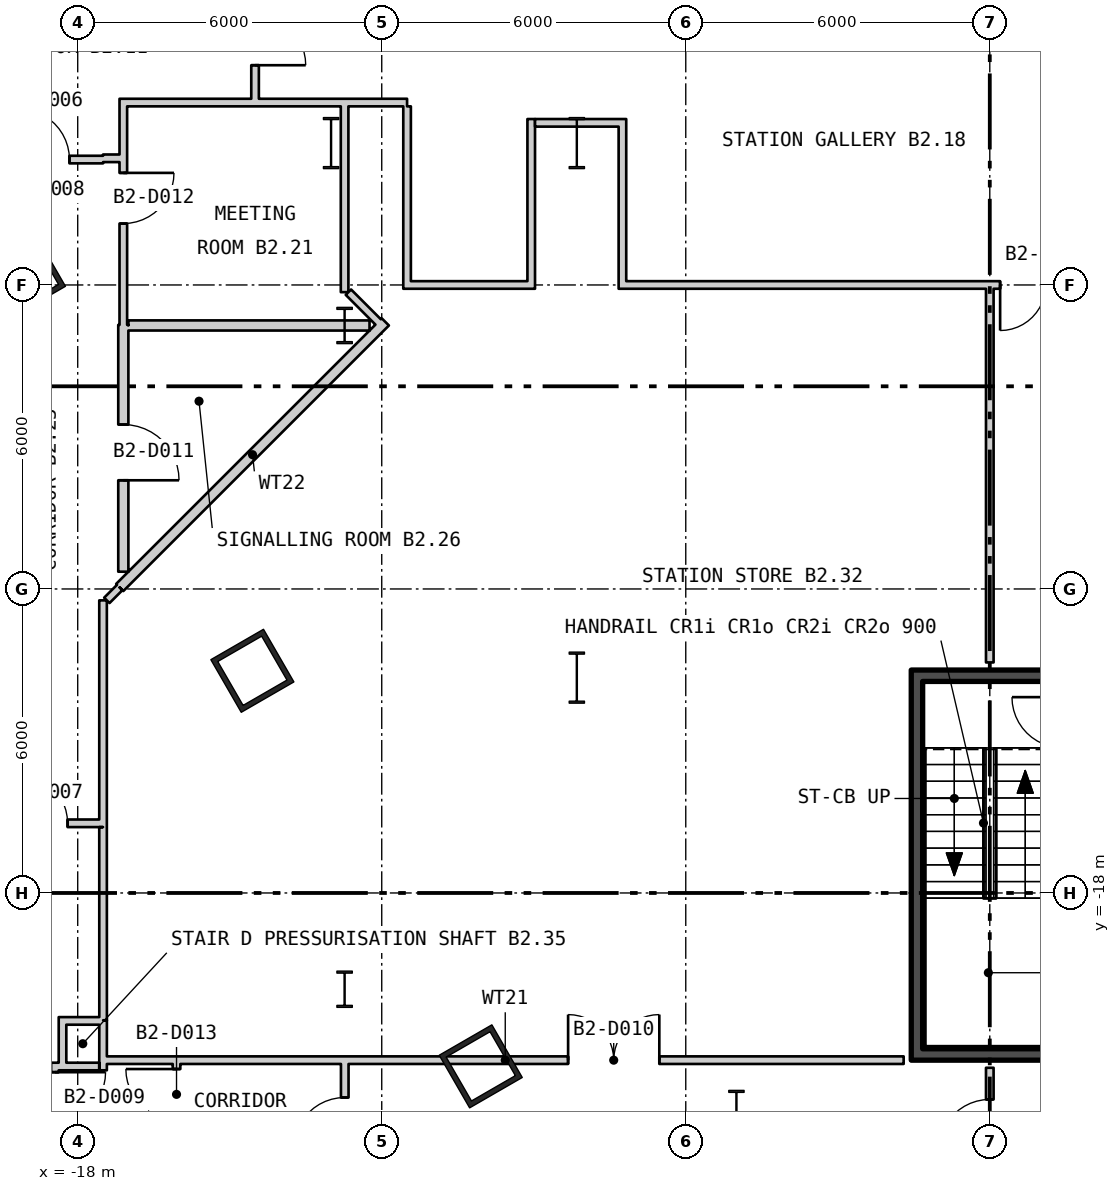
"""IFC4 building model, lengths in metres.
Left out: names, types, materials, properties, quantities, classifications, styles, units other than length and angle.
Written with IfcOpenShell. Run it as: python <this file> out.ifc"""

import sys

from ifc_helpers import new_model, si_unit, direction, frame, frame_2d, origin, origin_2d, place, context, subcontext, project, spatial, rectangle, hollow_rectangle, i_section, extrude, element, fill, save


model = new_model("IFC4")
c1 = context("Model", 3, precision=1e-05, world=origin(), true_north=direction((0.0, 1.0)))
c2 = subcontext(c1, "Body", "Model", "MODEL_VIEW")
j1 = project(units=[si_unit("LENGTHUNIT", "METRE"), si_unit("PLANEANGLEUNIT", "RADIAN")], contexts=[c1])
p1 = place(None, origin())
s1 = spatial("IfcSite", under=j1, at=p1, CompositionType="ELEMENT")
p2 = place(p1, origin())
s2 = spatial("IfcBuilding", under=s1, at=p2, CompositionType="ELEMENT")
p3 = place(p2, frame((0.0, 0.0, -11.4)))
s3 = spatial("IfcBuildingStorey", under=s2, at=p3, CompositionType="ELEMENT", Elevation=-11.4)
for number, where, z_axis, x_axis in (
    (1, (-19.061, -5.807, 0.0), (0.0, 0.0, 1.0), (0.5, -0.866, 0.0)),
    (2, (-14.553, -13.615, 0.0), (0.0, 0.0, 1.0), (0.5, -0.866, 0.0)),
    (3, (-10.046, -21.422, 0.0), (0.0, 0.0, 1.0), (0.5, -0.866, 0.0)),
):
    element("IfcColumn", number, at=place(p3, frame(where, z_axis=z_axis, x_axis=x_axis)), inside=s3, PredefinedType="COLUMN", context=c2, shape_type="SweptSolid", body=[
        extrude(hollow_rectangle(XDim=1.2, YDim=1.2, WallThickness=0.1, at=origin_2d()), origin(), (0.0, 0.0, 1.0), 5.7),
    ])
for number, where, z_axis, x_axis in (
    (4, (-8.15, -3.2, 0.0), (0.0, 0.0, 1.0), (1.0, 0.0, 0.0)),
    (5, (-8.15, -13.75, 0.0), (0.0, 0.0, 1.0), (1.0, 0.0, 0.0)),
    (6, (-5.0, -22.4, 0.0), (0.0, 0.0, 1.0), (1.0, 0.0, 0.0)),
    (7, (-13.0, -3.2, 0.0), (0.0, 0.0, 1.0), (1.0, 0.0, 0.0)),
):
    element("IfcColumn", number, at=place(p3, frame(where, z_axis=z_axis, x_axis=x_axis)), inside=s3, PredefinedType="COLUMN", context=c2, shape_type="SweptSolid", body=[
        extrude(i_section(OverallWidth=0.302, OverallDepth=1.008, WebThickness=0.021, FlangeThickness=0.04, at=origin_2d()), origin(), (0.0, 0.0, 1.0), 5.7),
    ])
for number, where, z_axis, x_axis in (
    (8, (-12.733, -6.8, 0.0), (0.0, 0.0, 1.0), (1.0, 0.0, 0.0)),
    (9, (-12.733, -19.9, 0.0), (0.0, 0.0, 1.0), (1.0, 0.0, 0.0)),
):
    element("IfcColumn", number, at=place(p3, frame(where, z_axis=z_axis, x_axis=x_axis)), inside=s3, PredefinedType="COLUMN", context=c2, shape_type="SweptSolid", body=[
        extrude(i_section(OverallWidth=0.304, OverallDepth=0.716, WebThickness=0.021, FlangeThickness=0.04, at=origin_2d()), origin(), (0.0, 0.0, 1.0), 5.7),
    ])
p4 = place(p3, frame((-1.438, -21.075, 0.0), z_axis=(0.0, 0.0, 1.0), x_axis=(0.0, 1.0, 0.0)))
e10 = element("IfcWall", 10, at=p4, inside=s3, PredefinedType="SHEAR", context=c2, shape_type="SweptSolid", body=[
    extrude(rectangle(XDim=7.25, YDim=0.225, at=frame_2d((3.625, 0.0))), origin(), (0.0, 0.0, 1.0), 5.25),
])
for number, where, z_axis, x_axis in (
    (11, (-1.55, -21.188, 0.0), (0.0, 0.0, 1.0), (1.0, 0.0, 0.0)),
    (12, (-1.55, -13.713, 0.0), (0.0, 0.0, 1.0), (1.0, 0.0, 0.0)),
):
    element("IfcWall", number, at=place(p3, frame(where, z_axis=z_axis, x_axis=x_axis)), inside=s3, PredefinedType="SHEAR", context=c2, shape_type="SweptSolid", body=[
        extrude(rectangle(XDim=3.1, YDim=0.225, at=frame_2d((1.55, 0.0))), origin(), (0.0, 0.0, 1.0), 5.25),
    ])
p5 = place(p3, frame((-19.825, -16.625, 0.0), z_axis=(0.0, 0.0, 1.0), x_axis=(1.0, 0.0, 0.0)))
e13 = element("IfcWall", 13, at=p5, inside=s3, PredefinedType="PARTITIONING", context=c2, shape_type="SweptSolid", body=[
    extrude(rectangle(XDim=2.25, YDim=0.15, at=frame_2d((1.125, 0.0))), origin(), (0.0, 0.0, 1.0), 5.25),
])
p6 = place(p5, frame((0.625, 0.0, 0.0)))
e14 = element("IfcOpeningElement", 14, at=p6, cuts=e13, PredefinedType="OPENING", context=c2, shape_type="SweptSolid", body=[
    extrude(rectangle(XDim=1.0, YDim=2.1, at=frame_2d((0.5, 1.05))), frame((0.0, 0.085, 0.0), z_axis=(0.0, -1.0, 0.0), x_axis=(1.0, 0.0, 0.0)), (0.0, 0.0, 1.0), 0.17),
])
p7 = place(p3, frame((-19.825, -3.525, 0.0), z_axis=(0.0, 0.0, 1.0), x_axis=(1.0, 0.0, 0.0)))
e15 = element("IfcWall", 15, at=p7, inside=s3, PredefinedType="PARTITIONING", context=c2, shape_type="SweptSolid", body=[
    extrude(rectangle(XDim=2.325, YDim=0.15, at=frame_2d((1.163, 0.0))), origin(), (0.0, 0.0, 1.0), 5.25),
])
p8 = place(p7, frame((0.662, 0.0, 0.0)))
e16 = element("IfcOpeningElement", 16, at=p8, cuts=e15, PredefinedType="OPENING", context=c2, shape_type="SweptSolid", body=[
    extrude(rectangle(XDim=1.0, YDim=2.1, at=frame_2d((0.5, 1.05))), frame((0.0, 0.085, 0.0), z_axis=(0.0, -1.0, 0.0), x_axis=(1.0, 0.0, 0.0)), (0.0, 0.0, 1.0), 0.17),
])
p9 = place(p3, frame((-18.45, -23.55, 0.0), z_axis=(0.0, 0.0, 1.0), x_axis=(0.0, 1.0, 0.0)))
e17 = element("IfcWall", 17, at=p9, inside=s3, PredefinedType="PARTITIONING", context=c2, shape_type="SweptSolid", body=[
    extrude(rectangle(XDim=2.2, YDim=0.15, at=frame_2d((1.1, 0.0))), origin(), (0.0, 0.0, 1.0), 5.25),
])
p10 = place(p9, frame((1.013, 0.0, 0.0)))
e18 = element("IfcOpeningElement", 18, at=p10, cuts=e17, PredefinedType="OPENING", context=c2, shape_type="SweptSolid", body=[
    extrude(rectangle(XDim=1.0, YDim=2.1, at=frame_2d((0.5, 1.05))), frame((0.0, 0.085, 0.0), z_axis=(0.0, -1.0, 0.0), x_axis=(1.0, 0.0, 0.0)), (0.0, 0.0, 1.0), 0.17),
])
p11 = place(p3, frame((-18.3, -21.5, 0.0), z_axis=(0.0, 0.0, 1.0), x_axis=(0.0, 1.0, 0.0)))
e19 = element("IfcWall", 19, at=p11, inside=s3, PredefinedType="PARTITIONING", context=c2, shape_type="SweptSolid", body=[
    extrude(rectangle(XDim=1.05, YDim=0.15, at=frame_2d((0.525, 0.0))), origin(), (0.0, 0.0, 1.0), 5.25),
])
p12 = place(p3, frame((-18.225, -21.425, 0.0), z_axis=(0.0, 0.0, 1.0), x_axis=(1.0, 0.0, 0.0)))
e20 = element("IfcWall", 20, at=p12, inside=s3, PredefinedType="PARTITIONING", context=c2, shape_type="SweptSolid", body=[
    extrude(rectangle(XDim=0.65, YDim=0.15, at=frame_2d((0.325, 0.0))), origin(), (0.0, 0.0, 1.0), 5.25),
])
p13 = place(p3, frame((-18.225, -20.525, 0.0), z_axis=(0.0, 0.0, 1.0), x_axis=(1.0, 0.0, 0.0)))
e21 = element("IfcWall", 21, at=p13, inside=s3, PredefinedType="PARTITIONING", context=c2, shape_type="SweptSolid", body=[
    extrude(rectangle(XDim=0.651, YDim=0.15, at=frame_2d((0.326, 0.0))), origin(), (0.0, 0.0, 1.0), 5.25),
])
p14 = place(p3, frame((-17.5, -21.5, 0.0), z_axis=(0.0, 0.0, 1.0), x_axis=(0.001013170706, 0.999999486742, 0.0)))
e22 = element("IfcWall", 22, at=p14, inside=s3, PredefinedType="PARTITIONING", context=c2, shape_type="SweptSolid", body=[
    extrude(rectangle(XDim=0.987, YDim=0.15, at=frame_2d((0.493, 0.0))), origin(), (0.0, 0.0, 1.0), 5.25),
])
p15 = place(p3, frame((-17.5, -16.7, 0.0), z_axis=(0.0, 0.0, 1.0), x_axis=(0.0, 1.0, 0.0)))
e23 = element("IfcWall", 23, at=p15, inside=s3, PredefinedType="PARTITIONING", context=c2, shape_type="SweptSolid", body=[
    extrude(rectangle(XDim=4.475, YDim=0.15, at=frame_2d((2.237, 0.0))), origin(), (0.0, 0.0, 1.0), 5.25),
])
p16 = place(p3, frame((-17.5, -3.5, 0.0), z_axis=(0.0, 0.0, 1.0), x_axis=(1.0, 0.0, 0.0)))
e24 = element("IfcWall", 24, at=p16, inside=s3, PredefinedType="PARTITIONING", context=c2, shape_type="SweptSolid", body=[
    extrude(rectangle(XDim=0.325, YDim=0.15, at=frame_2d((0.163, 0.0))), origin(), (0.0, 0.0, 1.0), 5.25),
])
p17 = place(p3, frame((-17.5, -16.7, 0.0), z_axis=(0.0, 0.0, 1.0), x_axis=(0.000262260678, -0.99999996561, 0.0)))
e25 = element("IfcWall", 25, at=p17, inside=s3, PredefinedType="PARTITIONING", context=c2, shape_type="SweptSolid", body=[
    extrude(rectangle(XDim=3.813, YDim=0.15, at=frame_2d((1.907, 0.0))), origin(), (0.0, 0.0, 1.0), 5.25),
])
p18 = place(p3, frame((-17.425, -12.225, 0.0), z_axis=(0.0, 0.0, 1.0), x_axis=(0.707106781187, 0.707106781187, 0.0)))
e26 = element("IfcWall", 26, at=p18, inside=s3, PredefinedType="PARTITIONING", context=c2, shape_type="SweptSolid", body=[
    extrude(rectangle(XDim=0.359, YDim=0.15, at=frame_2d((0.18, 0.0))), origin(), (0.0, 0.0, 1.0), 5.25),
])
p19 = place(p3, frame((-17.425, -21.3, 0.0), z_axis=(0.0, 0.0, 1.0), x_axis=(1.0, 0.0, 0.0)))
e27 = element("IfcWall", 27, at=p19, inside=s3, PredefinedType="PARTITIONING", context=c2, shape_type="SweptSolid", body=[
    extrude(rectangle(XDim=15.725, YDim=0.15, at=frame_2d((7.862, 0.0))), origin(), (0.0, 0.0, 1.0), 5.25),
])
p20 = place(p19, frame((9.103, 0.0, 0.0)))
e28 = element("IfcOpeningElement", 28, at=p20, cuts=e27, PredefinedType="OPENING", context=c2, shape_type="SweptSolid", body=[
    extrude(rectangle(XDim=1.8, YDim=2.1, at=frame_2d((0.9, 1.05))), frame((0.0, 0.085, 0.0), z_axis=(0.0, -1.0, 0.0), x_axis=(1.0, 0.0, 0.0)), (0.0, 0.0, 1.0), 0.17),
])
p21 = place(p3, frame((-17.175, -2.4, 0.0), z_axis=(0.0, 0.0, 1.0), x_axis=(1.0, 0.0, 0.0)))
e29 = element("IfcWall", 29, at=p21, inside=s3, PredefinedType="PARTITIONING", context=c2, shape_type="SweptSolid", body=[
    extrude(rectangle(XDim=5.675, YDim=0.15, at=frame_2d((2.837, 0.0))), origin(), (0.0, 0.0, 1.0), 5.25),
])
p22 = place(p3, frame((-17.171, -11.971, 0.0), z_axis=(0.0, 0.0, 1.0), x_axis=(0.707106781187, 0.707106781187, 0.0)))
e30 = element("IfcWall", 30, at=p22, inside=s3, PredefinedType="PARTITIONING", context=c2, shape_type="SweptSolid", body=[
    extrude(rectangle(XDim=7.413, YDim=0.2, at=frame_2d((3.707, 0.0))), origin(), (0.0, 0.0, 1.0), 5.25),
])
p23 = place(p3, frame((-17.1, -11.659, 0.0), z_axis=(0.0, 0.0, 1.0), x_axis=(0.0, 1.0, 0.0)))
e31 = element("IfcWall", 31, at=p23, inside=s3, PredefinedType="PARTITIONING", context=c2, shape_type="SweptSolid", body=[
    extrude(rectangle(XDim=4.871, YDim=0.2, at=frame_2d((2.436, 0.0))), origin(), (0.0, 0.0, 1.0), 5.25),
])
p24 = place(p23, frame((1.804, 0.0, 0.0)))
e32 = element("IfcOpeningElement", 32, at=p24, cuts=e31, PredefinedType="OPENING", context=c2, shape_type="SweptSolid", body=[
    extrude(rectangle(XDim=1.1, YDim=2.1, at=frame_2d((0.55, 1.05))), frame((0.0, 0.11, 0.0), z_axis=(0.0, -1.0, 0.0), x_axis=(1.0, 0.0, 0.0)), (0.0, 0.0, 1.0), 0.22),
])
p25 = place(p3, frame((-17.1, -6.788, 0.0), z_axis=(0.0, 0.0, 1.0), x_axis=(0.0, 1.0, 0.0)))
e33 = element("IfcWall", 33, at=p25, inside=s3, PredefinedType="PARTITIONING", context=c2, shape_type="SweptSolid", body=[
    extrude(rectangle(XDim=4.313, YDim=0.15, at=frame_2d((2.156, 0.0))), origin(), (0.0, 0.0, 1.0), 5.25),
])
p26 = place(p25, frame((2.0, 0.0, 0.0)))
e34 = element("IfcOpeningElement", 34, at=p26, cuts=e33, PredefinedType="OPENING", context=c2, shape_type="SweptSolid", body=[
    extrude(rectangle(XDim=1.0, YDim=2.1, at=frame_2d((0.5, 1.05))), frame((0.0, 0.085, 0.0), z_axis=(0.0, -1.0, 0.0), x_axis=(1.0, 0.0, 0.0)), (0.0, 0.0, 1.0), 0.17),
])
p27 = place(p3, frame((-17.0, -6.799, 0.0), z_axis=(0.0, 0.0, 1.0), x_axis=(0.999999977923, -0.000210128174, 0.0)))
e35 = element("IfcWall", 35, at=p27, inside=s3, PredefinedType="PARTITIONING", context=c2, shape_type="SweptSolid", body=[
    extrude(rectangle(XDim=4.759, YDim=0.2, at=frame_2d((2.38, 0.0))), origin(), (0.0, 0.0, 1.0), 5.25),
])
p28 = place(p3, frame((-16.05, -23.55, 0.0), z_axis=(0.0, 0.0, 1.0), x_axis=(0.0, 1.0, 0.0)))
e36 = element("IfcWall", 36, at=p28, inside=s3, PredefinedType="PARTITIONING", context=c2, shape_type="SweptSolid", body=[
    extrude(rectangle(XDim=2.175, YDim=0.15, at=frame_2d((1.087, 0.0))), origin(), (0.0, 0.0, 1.0), 5.25),
])
p29 = place(p28, frame((1.075, 0.0, 0.0)))
e37 = element("IfcOpeningElement", 37, at=p29, cuts=e36, PredefinedType="OPENING", context=c2, shape_type="SweptSolid", body=[
    extrude(rectangle(XDim=1.0, YDim=2.1, at=frame_2d((0.5, 1.05))), frame((0.0, 0.085, 0.0), z_axis=(0.0, -1.0, 0.0), x_axis=(1.0, 0.0, 0.0)), (0.0, 0.0, 1.0), 0.17),
])
p30 = place(p3, frame((-14.5, -2.325, 0.0), z_axis=(0.0, 0.0, 1.0), x_axis=(0.0, 1.0, 0.0)))
e38 = element("IfcWall", 38, at=p30, inside=s3, PredefinedType="PARTITIONING", context=c2, shape_type="SweptSolid", body=[
    extrude(rectangle(XDim=2.325, YDim=0.15, at=frame_2d((1.163, 0.0))), origin(), (0.0, 0.0, 1.0), 5.25),
])
p31 = place(p30, frame((0.662, 0.0, 0.0)))
e39 = element("IfcOpeningElement", 39, at=p31, cuts=e38, PredefinedType="OPENING", context=c2, shape_type="SweptSolid", body=[
    extrude(rectangle(XDim=1.0, YDim=2.1, at=frame_2d((0.5, 1.05))), frame((0.0, 0.085, 0.0), z_axis=(0.0, -1.0, 0.0), x_axis=(1.0, 0.0, 0.0)), (0.0, 0.0, 1.0), 0.17),
])
p32 = place(p3, frame((-12.733, -6.142, 0.0), z_axis=(0.0, 0.0, 1.0), x_axis=(0.0, 1.0, 0.0)))
e40 = element("IfcWall", 40, at=p32, inside=s3, PredefinedType="PARTITIONING", context=c2, shape_type="SweptSolid", body=[
    extrude(rectangle(XDim=3.667, YDim=0.15, at=frame_2d((1.833, 0.0))), origin(), (0.0, 0.0, 1.0), 5.25),
])
p33 = place(p3, frame((-12.73, -23.699, 0.0), z_axis=(0.0, 0.0, 1.0), x_axis=(0.0, 1.0, 0.0)))
e41 = element("IfcWall", 41, at=p33, inside=s3, PredefinedType="PARTITIONING", context=c2, shape_type="SweptSolid", body=[
    extrude(rectangle(XDim=2.324, YDim=0.15, at=frame_2d((1.162, 0.0))), origin(), (0.0, 0.0, 1.0), 5.25),
])
p34 = place(p33, frame((0.662, 0.0, 0.0)))
e42 = element("IfcOpeningElement", 42, at=p34, cuts=e41, PredefinedType="OPENING", context=c2, shape_type="SweptSolid", body=[
    extrude(rectangle(XDim=1.0, YDim=2.1, at=frame_2d((0.5, 1.05))), frame((0.0, 0.085, 0.0), z_axis=(0.0, -1.0, 0.0), x_axis=(1.0, 0.0, 0.0)), (0.0, 0.0, 1.0), 0.17),
])
p35 = place(p3, frame((-12.658, -6.142, 0.0), z_axis=(0.0, 0.0, 1.0), x_axis=(0.706504732317, -0.707708317892, 0.0)))
e43 = element("IfcWall", 43, at=p35, inside=s3, PredefinedType="PARTITIONING", context=c2, shape_type="SweptSolid", body=[
    extrude(rectangle(XDim=0.831, YDim=0.15, at=frame_2d((0.415, 0.0))), origin(), (0.0, 0.0, 1.0), 5.25),
])
p36 = place(p3, frame((-11.5, -6.075, 0.0), z_axis=(0.0, 0.0, 1.0), x_axis=(0.0, 1.0, 0.0)))
e44 = element("IfcWall", 44, at=p36, inside=s3, PredefinedType="PARTITIONING", context=c2, shape_type="SweptSolid", body=[
    extrude(rectangle(XDim=3.6, YDim=0.15, at=frame_2d((1.8, 0.0))), origin(), (0.0, 0.0, 1.0), 5.25),
])
p37 = place(p3, frame((-11.425, -6.0, 0.0), z_axis=(0.0, 0.0, 1.0), x_axis=(1.0, 0.0, 0.0)))
e45 = element("IfcWall", 45, at=p37, inside=s3, PredefinedType="PARTITIONING", context=c2, shape_type="SweptSolid", body=[
    extrude(rectangle(XDim=2.3, YDim=0.15, at=frame_2d((1.15, 0.0))), origin(), (0.0, 0.0, 1.0), 5.25),
])
p38 = place(p3, frame((-9.05, -6.075, 0.0), z_axis=(0.0, 0.0, 1.0), x_axis=(0.0, 1.0, 0.0)))
e46 = element("IfcWall", 46, at=p38, inside=s3, PredefinedType="PARTITIONING", context=c2, shape_type="SweptSolid", body=[
    extrude(rectangle(XDim=3.35, YDim=0.15, at=frame_2d((1.675, 0.0))), origin(), (0.0, 0.0, 1.0), 5.25),
])
p39 = place(p3, frame((-8.975, -2.8, 0.0), z_axis=(0.0, 0.0, 1.0), x_axis=(1.0, 0.0, 0.0)))
e47 = element("IfcWall", 47, at=p39, inside=s3, PredefinedType="PARTITIONING", context=c2, shape_type="SweptSolid", body=[
    extrude(rectangle(XDim=1.65, YDim=0.15, at=frame_2d((0.825, 0.0))), origin(), (0.0, 0.0, 1.0), 5.25),
])
p40 = place(p3, frame((-7.325, -6.0, 0.0), z_axis=(0.0, 0.0, 1.0), x_axis=(1.0, 0.0, 0.0)))
e48 = element("IfcWall", 48, at=p40, inside=s3, PredefinedType="PARTITIONING", context=c2, shape_type="SweptSolid", body=[
    extrude(rectangle(XDim=14.65, YDim=0.15, at=frame_2d((7.325, 0.0))), origin(), (0.0, 0.0, 1.0), 5.25),
])
p41 = place(p40, frame((7.529, 0.0, 0.0)))
e49 = element("IfcOpeningElement", 49, at=p41, cuts=e48, PredefinedType="OPENING", context=c2, shape_type="SweptSolid", body=[
    extrude(rectangle(XDim=1.8, YDim=2.1, at=frame_2d((0.9, 1.05))), frame((0.0, 0.085, 0.0), z_axis=(0.0, -1.0, 0.0), x_axis=(1.0, 0.0, 0.0)), (0.0, 0.0, 1.0), 0.17),
])
p42 = place(p3, frame((-7.25, -5.925, 0.0), z_axis=(0.0, 0.0, 1.0), x_axis=(0.0, 1.0, 0.0)))
e50 = element("IfcWall", 50, at=p42, inside=s3, PredefinedType="PARTITIONING", context=c2, shape_type="SweptSolid", body=[
    extrude(rectangle(XDim=3.2, YDim=0.15, at=frame_2d((1.6, 0.0))), origin(), (0.0, 0.0, 1.0), 5.25),
])
p43 = place(p3, frame((0.0, -23.7, 0.0), z_axis=(0.0, 0.0, 1.0), x_axis=(0.0, 1.0, 0.0)))
e51 = element("IfcWall", 51, at=p43, inside=s3, PredefinedType="PARTITIONING", context=c2, shape_type="SweptSolid", body=[
    extrude(rectangle(XDim=2.25, YDim=0.15, at=frame_2d((1.125, 0.0))), origin(), (0.0, 0.0, 1.0), 5.25),
])
p44 = place(p43, frame((0.625, 0.0, 0.0)))
e52 = element("IfcOpeningElement", 52, at=p44, cuts=e51, PredefinedType="OPENING", context=c2, shape_type="SweptSolid", body=[
    extrude(rectangle(XDim=1.0, YDim=2.1, at=frame_2d((0.5, 1.05))), frame((0.0, 0.085, 0.0), z_axis=(0.0, -1.0, 0.0), x_axis=(1.0, 0.0, 0.0)), (0.0, 0.0, 1.0), 0.17),
])
p45 = place(p3, frame((0.0, -13.45, 0.0), z_axis=(0.0, 0.0, 1.0), x_axis=(0.0, 1.0, 0.0)))
e53 = element("IfcWall", 53, at=p45, inside=s3, PredefinedType="PARTITIONING", context=c2, shape_type="SweptSolid", body=[
    extrude(rectangle(XDim=7.375, YDim=0.15, at=frame_2d((3.688, 0.0))), origin(), (0.0, 0.0, 1.0), 5.25),
])
p46 = place(p6, origin())
e54 = element("IfcDoor", 54, at=p46, inside=s3, OperationType="SINGLE_SWING_RIGHT", PredefinedType="DOOR", context=c2, shape_type="SweptSolid", body=[
    extrude(rectangle(XDim=1.0, YDim=2.1, at=frame_2d((0.5, 1.05))), frame((0.0, 0.025, 0.0), z_axis=(0.0, -1.0, 0.0), x_axis=(1.0, 0.0, 0.0)), (0.0, 0.0, 1.0), 0.05),
])
fill(e14, e54)
p47 = place(p8, origin())
e55 = element("IfcDoor", 55, at=p47, inside=s3, OperationType="SINGLE_SWING_RIGHT", PredefinedType="DOOR", context=c2, shape_type="SweptSolid", body=[
    extrude(rectangle(XDim=1.0, YDim=2.1, at=frame_2d((0.5, 1.05))), frame((0.0, 0.025, 0.0), z_axis=(0.0, -1.0, 0.0), x_axis=(1.0, 0.0, 0.0)), (0.0, 0.0, 1.0), 0.05),
])
fill(e16, e55)
p48 = place(p10, origin())
e56 = element("IfcDoor", 56, at=p48, inside=s3, OperationType="SINGLE_SWING_RIGHT", PredefinedType="DOOR", context=c2, shape_type="SweptSolid", body=[
    extrude(rectangle(XDim=1.0, YDim=2.1, at=frame_2d((0.5, 1.05))), frame((0.0, 0.025, 0.0), z_axis=(0.0, -1.0, 0.0), x_axis=(1.0, 0.0, 0.0)), (0.0, 0.0, 1.0), 0.05),
])
fill(e18, e56)
p49 = place(p20, origin())
e57 = element("IfcDoor", 57, at=p49, inside=s3, OperationType="DOUBLE_DOOR_SINGLE_SWING", PredefinedType="DOOR", context=c2, shape_type="SweptSolid", body=[
    extrude(rectangle(XDim=1.8, YDim=2.1, at=frame_2d((0.9, 1.05))), frame((0.0, 0.025, 0.0), z_axis=(0.0, -1.0, 0.0), x_axis=(1.0, 0.0, 0.0)), (0.0, 0.0, 1.0), 0.05),
])
fill(e28, e57)
p50 = place(p24, origin())
e58 = element("IfcDoor", 58, at=p50, inside=s3, OperationType="SINGLE_SWING_LEFT", PredefinedType="DOOR", context=c2, shape_type="SweptSolid", body=[
    extrude(rectangle(XDim=1.1, YDim=2.1, at=frame_2d((0.55, 1.05))), frame((0.0, 0.025, 0.0), z_axis=(0.0, -1.0, 0.0), x_axis=(1.0, 0.0, 0.0)), (0.0, 0.0, 1.0), 0.05),
])
fill(e32, e58)
p51 = place(p26, origin())
e59 = element("IfcDoor", 59, at=p51, inside=s3, OperationType="SINGLE_SWING_RIGHT", PredefinedType="DOOR", context=c2, shape_type="SweptSolid", body=[
    extrude(rectangle(XDim=1.0, YDim=2.1, at=frame_2d((0.5, 1.05))), frame((0.0, 0.025, 0.0), z_axis=(0.0, -1.0, 0.0), x_axis=(1.0, 0.0, 0.0)), (0.0, 0.0, 1.0), 0.05),
])
fill(e34, e59)
p52 = place(p29, origin())
e60 = element("IfcDoor", 60, at=p52, inside=s3, OperationType="SINGLE_SWING_LEFT", PredefinedType="DOOR", context=c2, shape_type="SweptSolid", body=[
    extrude(rectangle(XDim=1.0, YDim=2.1, at=frame_2d((0.5, 1.05))), frame((0.0, 0.025, 0.0), z_axis=(0.0, -1.0, 0.0), x_axis=(1.0, 0.0, 0.0)), (0.0, 0.0, 1.0), 0.05),
])
fill(e37, e60)
p53 = place(p31, origin())
e61 = element("IfcDoor", 61, at=p53, inside=s3, OperationType="SINGLE_SWING_LEFT", PredefinedType="DOOR", context=c2, shape_type="SweptSolid", body=[
    extrude(rectangle(XDim=1.0, YDim=2.1, at=frame_2d((0.5, 1.05))), frame((0.0, 0.025, 0.0), z_axis=(0.0, -1.0, 0.0), x_axis=(1.0, 0.0, 0.0)), (0.0, 0.0, 1.0), 0.05),
])
fill(e39, e61)
p54 = place(p34, origin())
e62 = element("IfcDoor", 62, at=p54, inside=s3, OperationType="SINGLE_SWING_RIGHT", PredefinedType="DOOR", context=c2, shape_type="SweptSolid", body=[
    extrude(rectangle(XDim=1.0, YDim=2.1, at=frame_2d((0.5, 1.05))), frame((0.0, 0.025, 0.0), z_axis=(0.0, -1.0, 0.0), x_axis=(1.0, 0.0, 0.0)), (0.0, 0.0, 1.0), 0.05),
])
fill(e42, e62)
p55 = place(p41, origin())
e63 = element("IfcDoor", 63, at=p55, inside=s3, OperationType="DOUBLE_DOOR_SINGLE_SWING", PredefinedType="DOOR", context=c2, shape_type="SweptSolid", body=[
    extrude(rectangle(XDim=1.8, YDim=2.1, at=frame_2d((0.9, 1.05))), frame((0.0, 0.025, 0.0), z_axis=(0.0, -1.0, 0.0), x_axis=(1.0, 0.0, 0.0)), (0.0, 0.0, 1.0), 0.05),
])
fill(e49, e63)
p56 = place(p44, origin())
e64 = element("IfcDoor", 64, at=p56, inside=s3, OperationType="SINGLE_SWING_RIGHT", PredefinedType="DOOR", context=c2, shape_type="SweptSolid", body=[
    extrude(rectangle(XDim=1.0, YDim=2.1, at=frame_2d((0.5, 1.05))), frame((0.0, 0.025, 0.0), z_axis=(0.0, -1.0, 0.0), x_axis=(1.0, 0.0, 0.0)), (0.0, 0.0, 1.0), 0.05),
])
fill(e52, e64)
save(model, sys.argv[1])
